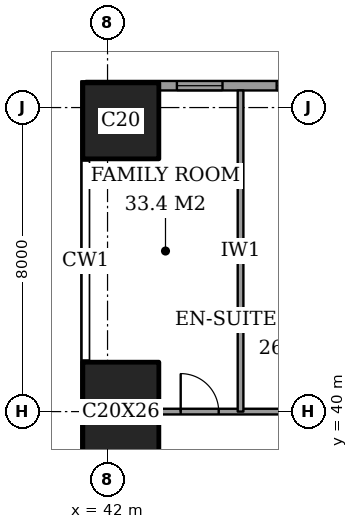
"""IFC4 building model, lengths in metres.
Left out: names, types, materials, properties, quantities, classifications, styles, units other than length and angle.
Written with IfcOpenShell. Run it as: python <this file> out.ifc"""

import sys

from ifc_helpers import new_model, si_unit, direction, frame, frame_2d, origin, origin_2d, place, context, subcontext, project, spatial, rectangle, extrude, element, fill, save


model = new_model("IFC4")
c1 = context("Model", 3, precision=1e-05, world=origin(), true_north=direction((0.0, 1.0)))
c2 = subcontext(c1, "Body", "Model", "MODEL_VIEW")
j1 = project(units=[si_unit("LENGTHUNIT", "METRE"), si_unit("PLANEANGLEUNIT", "RADIAN")], contexts=[c1])
p1 = place(None, origin())
s1 = spatial("IfcSite", under=j1, at=p1, CompositionType="ELEMENT")
p2 = place(p1, origin())
s2 = spatial("IfcBuilding", under=s1, at=p2, CompositionType="ELEMENT")
p3 = place(p2, frame((0.0, 0.0, 234.0)))
s3 = spatial("IfcBuildingStorey", under=s2, at=p3, CompositionType="ELEMENT", Elevation=234.0)
p4 = place(p3, frame((42.35, 40.0, 0.0), z_axis=(0.0, 0.0, 1.0), x_axis=(1.0, 0.0, 0.0)))
e1 = element("IfcColumn", 1, at=p4, inside=s3, PredefinedType="COLUMN", context=c2, shape_type="SweptSolid", body=[
    extrude(rectangle(XDim=2.0, YDim=2.6, at=origin_2d()), origin(), (0.0, 0.0, 1.0), 3.6),
])
p5 = place(p3, frame((42.35, 47.65, 0.0), z_axis=(0.0, 0.0, 1.0), x_axis=(1.0, 0.0, 0.0)))
e2 = element("IfcColumn", 2, at=p5, inside=s3, PredefinedType="COLUMN", context=c2, shape_type="SweptSolid", body=[
    extrude(rectangle(XDim=2.0, YDim=2.0, at=origin_2d()), origin(), (0.0, 0.0, 1.0), 3.6),
])
p6 = place(p3, frame((62.825, 48.575, 0.0), z_axis=(0.0, 0.0, 1.0), x_axis=(-1.0, 0.0, 0.0)))
e3 = element("IfcWall", 3, at=p6, inside=s3, PredefinedType="SOLIDWALL", context=c2, shape_type="SweptSolid", body=[
    extrude(rectangle(XDim=21.4, YDim=0.25, at=frame_2d((10.7, 0.0))), origin(), (0.0, 0.0, 1.0), 3.6),
])
p7 = place(p6, frame((0.55, 0.0, 0.6)))
e4 = element("IfcOpeningElement", 4, at=p7, cuts=e3, PredefinedType="OPENING", context=c2, shape_type="SweptSolid", body=[
    extrude(rectangle(XDim=1.2, YDim=2.0, at=frame_2d((0.6, 1.0))), frame((0.0, 0.135, 0.0), z_axis=(0.0, -1.0, 0.0), x_axis=(1.0, 0.0, 0.0)), (0.0, 0.0, 1.0), 0.27),
])
p8 = place(p6, frame((2.475, 0.0, 0.6)))
e5 = element("IfcOpeningElement", 5, at=p8, cuts=e3, PredefinedType="OPENING", context=c2, shape_type="SweptSolid", body=[
    extrude(rectangle(XDim=1.2, YDim=2.0, at=frame_2d((0.6, 1.0))), frame((0.0, 0.135, 0.0), z_axis=(0.0, -1.0, 0.0), x_axis=(1.0, 0.0, 0.0)), (0.0, 0.0, 1.0), 0.27),
])
p9 = place(p6, frame((6.225, 0.0, 0.6)))
e6 = element("IfcOpeningElement", 6, at=p9, cuts=e3, PredefinedType="OPENING", context=c2, shape_type="SweptSolid", body=[
    extrude(rectangle(XDim=1.2, YDim=2.0, at=frame_2d((0.6, 1.0))), frame((0.0, 0.135, 0.0), z_axis=(0.0, -1.0, 0.0), x_axis=(1.0, 0.0, 0.0)), (0.0, 0.0, 1.0), 0.27),
])
p10 = place(p6, frame((8.4, 0.0, 0.6)))
e7 = element("IfcOpeningElement", 7, at=p10, cuts=e3, PredefinedType="OPENING", context=c2, shape_type="SweptSolid", body=[
    extrude(rectangle(XDim=1.2, YDim=2.0, at=frame_2d((0.6, 1.0))), frame((0.0, 0.135, 0.0), z_axis=(0.0, -1.0, 0.0), x_axis=(1.0, 0.0, 0.0)), (0.0, 0.0, 1.0), 0.27),
])
p11 = place(p6, frame((10.325, 0.0, 0.6)))
e8 = element("IfcOpeningElement", 8, at=p11, cuts=e3, PredefinedType="OPENING", context=c2, shape_type="SweptSolid", body=[
    extrude(rectangle(XDim=1.2, YDim=2.0, at=frame_2d((0.6, 1.0))), frame((0.0, 0.135, 0.0), z_axis=(0.0, -1.0, 0.0), x_axis=(1.0, 0.0, 0.0)), (0.0, 0.0, 1.0), 0.27),
])
p12 = place(p6, frame((15.175, 0.0, 0.6)))
e9 = element("IfcOpeningElement", 9, at=p12, cuts=e3, PredefinedType="OPENING", context=c2, shape_type="SweptSolid", body=[
    extrude(rectangle(XDim=1.2, YDim=2.0, at=frame_2d((0.6, 1.0))), frame((0.0, 0.135, 0.0), z_axis=(0.0, -1.0, 0.0), x_axis=(1.0, 0.0, 0.0)), (0.0, 0.0, 1.0), 0.27),
])
p13 = place(p6, frame((17.8, 0.0, 0.6)))
e10 = element("IfcOpeningElement", 10, at=p13, cuts=e3, PredefinedType="OPENING", context=c2, shape_type="SweptSolid", body=[
    extrude(rectangle(XDim=1.2, YDim=2.0, at=frame_2d((0.6, 1.0))), frame((0.0, 0.135, 0.0), z_axis=(0.0, -1.0, 0.0), x_axis=(1.0, 0.0, 0.0)), (0.0, 0.0, 1.0), 0.27),
])
p14 = place(p3, frame((43.35, 40.0, 0.0), z_axis=(0.0, 0.0, 1.0), x_axis=(1.0, 0.0, 0.0)))
e11 = element("IfcWall", 11, at=p14, inside=s3, PredefinedType="PARTITIONING", context=c2, shape_type="SweptSolid", body=[
    extrude(rectangle(XDim=5.45, YDim=0.15, at=frame_2d((2.725, 0.0))), origin(), (0.0, 0.0, 1.0), 3.35),
])
p15 = place(p14, frame((0.575, 0.0, 0.0)))
e12 = element("IfcOpeningElement", 12, at=p15, cuts=e11, PredefinedType="OPENING", context=c2, shape_type="SweptSolid", body=[
    extrude(rectangle(XDim=1.0, YDim=2.1, at=frame_2d((0.5, 1.05))), frame((0.0, 0.085, 0.0), z_axis=(0.0, -1.0, 0.0), x_axis=(1.0, 0.0, 0.0)), (0.0, 0.0, 1.0), 0.17),
])
p16 = place(p3, frame((45.5, 40.0, 0.0), z_axis=(0.0, 0.0, 1.0), x_axis=(0.0, 1.0, 0.0)))
e13 = element("IfcWall", 13, at=p16, inside=s3, PredefinedType="PARTITIONING", context=c2, shape_type="SweptSolid", body=[
    extrude(rectangle(XDim=8.45, YDim=0.15, at=frame_2d((4.225, 0.0))), origin(), (0.0, 0.0, 1.0), 3.35),
])
p17 = place(p12, origin())
e14 = element("IfcWindow", 14, at=p17, inside=s3, PartitioningType="SINGLE_PANEL", PredefinedType="WINDOW", context=c2, shape_type="SweptSolid", body=[
    extrude(rectangle(XDim=1.2, YDim=2.0, at=frame_2d((0.6, 1.0))), frame((0.0, 0.03, 0.0), z_axis=(0.0, -1.0, 0.0), x_axis=(1.0, 0.0, 0.0)), (0.0, 0.0, 1.0), 0.06),
])
fill(e9, e14)
p18 = place(p13, origin())
e15 = element("IfcWindow", 15, at=p18, inside=s3, PartitioningType="SINGLE_PANEL", PredefinedType="WINDOW", context=c2, shape_type="SweptSolid", body=[
    extrude(rectangle(XDim=1.2, YDim=2.0, at=frame_2d((0.6, 1.0))), frame((0.0, 0.03, 0.0), z_axis=(0.0, -1.0, 0.0), x_axis=(1.0, 0.0, 0.0)), (0.0, 0.0, 1.0), 0.06),
])
fill(e10, e15)
p19 = place(p15, origin())
e16 = element("IfcDoor", 16, at=p19, inside=s3, OperationType="SINGLE_SWING_RIGHT", PredefinedType="DOOR", context=c2, shape_type="SweptSolid", body=[
    extrude(rectangle(XDim=1.0, YDim=2.1, at=frame_2d((0.5, 1.05))), frame((0.0, 0.025, 0.0), z_axis=(0.0, -1.0, 0.0), x_axis=(1.0, 0.0, 0.0)), (0.0, 0.0, 1.0), 0.05),
])
fill(e12, e16)
save(model, sys.argv[1])
